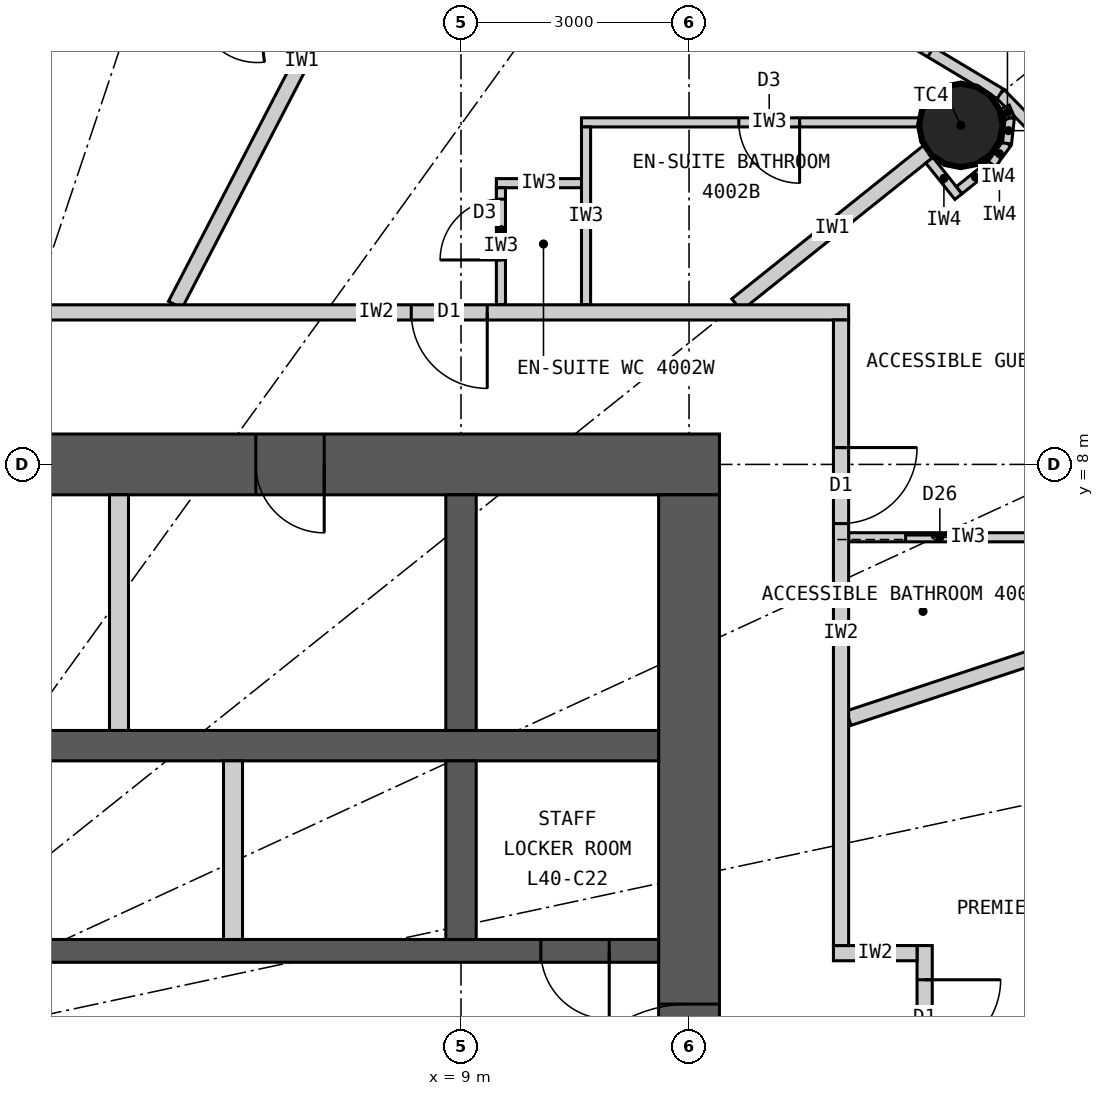
"""IFC4 building model, lengths in metres.
Left out: names, types, materials, properties, quantities, classifications, styles, units other than length and angle.
Written with IfcOpenShell. Run it as: python <this file> out.ifc"""

import sys

from ifc_helpers import new_model, si_unit, direction, frame, frame_2d, origin, origin_2d, place, context, subcontext, project, spatial, rectangle, circle, extrude, element, fill, save


model = new_model("IFC4")
c1 = context("Model", 3, precision=1e-05, world=origin(), true_north=direction((0.0, 1.0)))
c2 = subcontext(c1, "Body", "Model", "MODEL_VIEW")
j1 = project(units=[si_unit("LENGTHUNIT", "METRE"), si_unit("PLANEANGLEUNIT", "RADIAN")], contexts=[c1])
p1 = place(None, origin())
s1 = spatial("IfcSite", under=j1, at=p1, CompositionType="ELEMENT")
p2 = place(p1, origin())
s2 = spatial("IfcBuilding", under=s1, at=p2, CompositionType="ELEMENT")
p3 = place(p2, frame((0.0, 0.0, 153.3)))
s3 = spatial("IfcBuildingStorey", under=s2, at=p3, CompositionType="ELEMENT", Elevation=153.3)
p4 = place(p3, frame((15.576, 12.461, 0.0), z_axis=(0.0, 0.0, 1.0), x_axis=(1.0, 0.0, 0.0)))
e1 = element("IfcColumn", 1, at=p4, inside=s3, PredefinedType="COLUMN", context=c2, shape_type="SweptSolid", body=[
    extrude(circle(Radius=0.55, at=origin_2d()), origin(), (0.0, 0.0, 1.0), 3.3),
])
p5 = place(p3, frame((-12.4, 8.0, 0.0), z_axis=(0.0, 0.0, 1.0), x_axis=(1.0, 0.0, 0.0)))
e2 = element("IfcWall", 2, at=p5, inside=s3, PredefinedType="SHEAR", context=c2, shape_type="SweptSolid", body=[
    extrude(rectangle(XDim=24.8, YDim=0.8, at=frame_2d((12.4, 0.0))), origin(), (0.0, 0.0, 1.0), 3.3),
])
p6 = place(p5, frame((11.1, 0.0, 0.0)))
e3 = element("IfcOpeningElement", 3, at=p6, cuts=e2, PredefinedType="OPENING", context=c2, shape_type="SweptSolid", body=[
    extrude(rectangle(XDim=1.2, YDim=2.2, at=frame_2d((0.6, 1.1))), frame((0.0, 0.41, 0.0), z_axis=(0.0, -1.0, 0.0), x_axis=(1.0, 0.0, 0.0)), (0.0, 0.0, 1.0), 0.82),
])
p7 = place(p5, frame((18.7, 0.0, 0.0)))
e4 = element("IfcOpeningElement", 4, at=p7, cuts=e2, PredefinedType="OPENING", context=c2, shape_type="SweptSolid", body=[
    extrude(rectangle(XDim=0.9, YDim=2.2, at=frame_2d((0.45, 1.1))), frame((0.0, 0.41, 0.0), z_axis=(0.0, -1.0, 0.0), x_axis=(1.0, 0.0, 0.0)), (0.0, 0.0, 1.0), 0.82),
])
p8 = place(p3, frame((12.0, -7.6, 0.0), z_axis=(0.0, 0.0, 1.0), x_axis=(0.0, 1.0, 0.0)))
e5 = element("IfcWall", 5, at=p8, inside=s3, PredefinedType="SHEAR", context=c2, shape_type="SweptSolid", body=[
    extrude(rectangle(XDim=15.2, YDim=0.8, at=frame_2d((7.6, 0.0))), origin(), (0.0, 0.0, 1.0), 3.3),
])
p9 = place(p8, frame((6.7, 0.0, 0.0)))
e6 = element("IfcOpeningElement", 6, at=p9, cuts=e5, PredefinedType="OPENING", context=c2, shape_type="SweptSolid", body=[
    extrude(rectangle(XDim=1.8, YDim=2.2, at=frame_2d((0.9, 1.1))), frame((0.0, 0.41, 0.0), z_axis=(0.0, -1.0, 0.0), x_axis=(1.0, 0.0, 0.0)), (0.0, 0.0, 1.0), 0.82),
])
p10 = place(p3, frame((-11.6, 4.3, 0.0), z_axis=(0.0, 0.0, 1.0), x_axis=(1.0, 0.0, 0.0)))
e7 = element("IfcWall", 7, at=p10, inside=s3, PredefinedType="SHEAR", context=c2, shape_type="SweptSolid", body=[
    extrude(rectangle(XDim=23.2, YDim=0.4, at=frame_2d((11.6, 0.0))), origin(), (0.0, 0.0, 1.0), 3.3),
])
p11 = place(p3, frame((-11.6, 1.6, 0.0), z_axis=(0.0, 0.0, 1.0), x_axis=(1.0, 0.0, 0.0)))
e8 = element("IfcWall", 8, at=p11, inside=s3, PredefinedType="SHEAR", context=c2, shape_type="SweptSolid", body=[
    extrude(rectangle(XDim=23.2, YDim=0.3, at=frame_2d((11.6, 0.0))), origin(), (0.0, 0.0, 1.0), 3.3),
])
p12 = place(p11, frame((9.55, 0.0, 0.0)))
e9 = element("IfcOpeningElement", 9, at=p12, cuts=e8, PredefinedType="OPENING", context=c2, shape_type="SweptSolid", body=[
    extrude(rectangle(XDim=1.1, YDim=2.2, at=frame_2d((0.55, 1.1))), frame((0.0, 0.16, 0.0), z_axis=(0.0, -1.0, 0.0), x_axis=(1.0, 0.0, 0.0)), (0.0, 0.0, 1.0), 0.32),
])
p13 = place(p11, frame((12.55, 0.0, 0.0)))
e10 = element("IfcOpeningElement", 10, at=p13, cuts=e8, PredefinedType="OPENING", context=c2, shape_type="SweptSolid", body=[
    extrude(rectangle(XDim=1.1, YDim=2.2, at=frame_2d((0.55, 1.1))), frame((0.0, 0.16, 0.0), z_axis=(0.0, -1.0, 0.0), x_axis=(1.0, 0.0, 0.0)), (0.0, 0.0, 1.0), 0.32),
])
p14 = place(p11, frame((5.15, 0.0, 0.0)))
e11 = element("IfcOpeningElement", 11, at=p14, cuts=e8, PredefinedType="OPENING", context=c2, shape_type="SweptSolid", body=[
    extrude(rectangle(XDim=0.9, YDim=2.2, at=frame_2d((0.45, 1.1))), frame((0.0, 0.16, 0.0), z_axis=(0.0, -1.0, 0.0), x_axis=(1.0, 0.0, 0.0)), (0.0, 0.0, 1.0), 0.32),
])
p15 = place(p11, frame((21.65, 0.0, 0.0)))
e12 = element("IfcOpeningElement", 12, at=p15, cuts=e8, PredefinedType="OPENING", context=c2, shape_type="SweptSolid", body=[
    extrude(rectangle(XDim=0.9, YDim=2.2, at=frame_2d((0.45, 1.1))), frame((0.0, 0.16, 0.0), z_axis=(0.0, -1.0, 0.0), x_axis=(1.0, 0.0, 0.0)), (0.0, 0.0, 1.0), 0.32),
])
p16 = place(p11, frame((0.65, 0.0, 0.0)))
e13 = element("IfcOpeningElement", 13, at=p16, cuts=e8, PredefinedType="OPENING", context=c2, shape_type="SweptSolid", body=[
    extrude(rectangle(XDim=0.9, YDim=2.2, at=frame_2d((0.45, 1.1))), frame((0.0, 0.16, 0.0), z_axis=(0.0, -1.0, 0.0), x_axis=(1.0, 0.0, 0.0)), (0.0, 0.0, 1.0), 0.32),
])
p17 = place(p3, frame((9.0, 4.5, 0.0), z_axis=(0.0, 0.0, 1.0), x_axis=(0.0, 1.0, 0.0)))
e14 = element("IfcWall", 14, at=p17, inside=s3, PredefinedType="SHEAR", context=c2, shape_type="SweptSolid", body=[
    extrude(rectangle(XDim=3.1, YDim=0.4, at=frame_2d((1.55, 0.0))), origin(), (0.0, 0.0, 1.0), 3.3),
])
p18 = place(p3, frame((9.0, 1.75, 0.0), z_axis=(0.0, 0.0, 1.0), x_axis=(0.0, 1.0, 0.0)))
e15 = element("IfcWall", 15, at=p18, inside=s3, PredefinedType="SHEAR", context=c2, shape_type="SweptSolid", body=[
    extrude(rectangle(XDim=2.35, YDim=0.4, at=frame_2d((1.175, 0.0))), origin(), (0.0, 0.0, 1.0), 3.3),
])
p19 = place(p3, frame((4.5, 4.5, 0.0), z_axis=(0.0, 0.0, 1.0), x_axis=(0.0, 1.0, 0.0)))
e16 = element("IfcWall", 16, at=p19, inside=s3, PredefinedType="PARTITIONING", context=c2, shape_type="SweptSolid", body=[
    extrude(rectangle(XDim=3.1, YDim=0.25, at=frame_2d((1.55, 0.0))), origin(), (0.0, 0.0, 1.0), 3.3),
])
p20 = place(p3, frame((6.0, 1.75, 0.0), z_axis=(0.0, 0.0, 1.0), x_axis=(0.0, 1.0, 0.0)))
e17 = element("IfcWall", 17, at=p20, inside=s3, PredefinedType="PARTITIONING", context=c2, shape_type="SweptSolid", body=[
    extrude(rectangle(XDim=2.35, YDim=0.25, at=frame_2d((1.175, 0.0))), origin(), (0.0, 0.0, 1.0), 3.3),
])
p21 = place(p3, frame((19.772, 9.132, 0.0), z_axis=(0.0, 0.0, 1.0), x_axis=(-0.700727467776, 0.71342905457, 0.0)))
e18 = element("IfcWall", 18, at=p21, inside=s3, PredefinedType="ELEMENTEDWALL", context=c2, shape_type="SweptSolid", body=[
    extrude(rectangle(XDim=5.247, YDim=0.15, at=frame_2d((2.624, 0.0))), origin(), (0.0, 0.0, 1.0), 3.12),
])
p22 = place(p21, frame((0.924, 0.0, 0.9)))
e19 = element("IfcOpeningElement", 19, at=p22, cuts=e18, PredefinedType="OPENING", context=c2, shape_type="SweptSolid", body=[
    extrude(rectangle(XDim=1.4, YDim=1.9, at=frame_2d((0.7, 0.95))), frame((0.0, 0.085, 0.0), z_axis=(0.0, -1.0, 0.0), x_axis=(1.0, 0.0, 0.0)), (0.0, 0.0, 1.0), 0.17),
])
p23 = place(p21, frame((2.924, 0.0, 0.9)))
e20 = element("IfcOpeningElement", 20, at=p23, cuts=e18, PredefinedType="OPENING", context=c2, shape_type="SweptSolid", body=[
    extrude(rectangle(XDim=1.4, YDim=1.9, at=frame_2d((0.7, 0.95))), frame((0.0, 0.085, 0.0), z_axis=(0.0, -1.0, 0.0), x_axis=(1.0, 0.0, 0.0)), (0.0, 0.0, 1.0), 0.17),
])
p24 = place(p3, frame((16.095, 12.876, 0.0), z_axis=(0.0, 0.0, 1.0), x_axis=(-0.857695199231, 0.514158482587, 0.0)))
e21 = element("IfcWall", 21, at=p24, inside=s3, PredefinedType="ELEMENTEDWALL", context=c2, shape_type="SweptSolid", body=[
    extrude(rectangle(XDim=5.536, YDim=0.15, at=frame_2d((2.768, 0.0))), origin(), (0.0, 0.0, 1.0), 3.12),
])
p25 = place(p24, frame((1.068, 0.0, 0.9)))
e22 = element("IfcOpeningElement", 22, at=p25, cuts=e21, PredefinedType="OPENING", context=c2, shape_type="SweptSolid", body=[
    extrude(rectangle(XDim=1.4, YDim=1.9, at=frame_2d((0.7, 0.95))), frame((0.0, 0.085, 0.0), z_axis=(0.0, -1.0, 0.0), x_axis=(1.0, 0.0, 0.0)), (0.0, 0.0, 1.0), 0.17),
])
p26 = place(p24, frame((3.068, 0.0, 0.9)))
e23 = element("IfcOpeningElement", 23, at=p26, cuts=e21, PredefinedType="OPENING", context=c2, shape_type="SweptSolid", body=[
    extrude(rectangle(XDim=1.4, YDim=1.9, at=frame_2d((0.7, 0.95))), frame((0.0, 0.085, 0.0), z_axis=(0.0, -1.0, 0.0), x_axis=(1.0, 0.0, 0.0)), (0.0, 0.0, 1.0), 0.17),
])
p27 = place(p3, frame((14.1, 4.661, 0.0), z_axis=(0.0, 0.0, 1.0), x_axis=(0.949453216399, 0.313908569285, 0.0)))
e24 = element("IfcWall", 24, at=p27, inside=s3, PredefinedType="PARTITIONING", context=c2, shape_type="SweptSolid", body=[
    extrude(rectangle(XDim=7.109, YDim=0.2, at=frame_2d((3.554, 0.0))), origin(), (0.0, 0.0, 1.0), 3.12),
])
p28 = place(p3, frame((12.625, 10.1, 0.0), z_axis=(0.0, 0.0, 1.0), x_axis=(0.780876185034, 0.624685827954, 0.0)))
e25 = element("IfcWall", 25, at=p28, inside=s3, PredefinedType="PARTITIONING", context=c2, shape_type="SweptSolid", body=[
    extrude(rectangle(XDim=3.229, YDim=0.2, at=frame_2d((1.615, 0.0))), origin(), (0.0, 0.0, 1.0), 2.42),
])
p29 = place(p3, frame((5.24, 10.1, 0.0), z_axis=(0.0, 0.0, 1.0), x_axis=(0.460532965373, 0.887642601391, 0.0)))
e26 = element("IfcWall", 26, at=p29, inside=s3, PredefinedType="PARTITIONING", context=c2, shape_type="SweptSolid", body=[
    extrude(rectangle(XDim=7.231, YDim=0.2, at=frame_2d((3.616, 0.0))), origin(), (0.0, 0.0, 1.0), 3.12),
])
p30 = place(p3, frame((15.1, -1.67, 0.0), z_axis=(0.0, 0.0, 1.0), x_axis=(0.0, 1.0, 0.0)))
e27 = element("IfcWall", 27, at=p30, inside=s3, PredefinedType="PARTITIONING", context=c2, shape_type="SweptSolid", body=[
    extrude(rectangle(XDim=3.34, YDim=0.2, at=frame_2d((1.67, 0.0))), origin(), (0.0, 0.0, 1.0), 3.12),
])
p31 = place(p30, frame((0.45, 0.0, 0.0)))
e28 = element("IfcOpeningElement", 28, at=p31, cuts=e27, PredefinedType="OPENING", context=c2, shape_type="SweptSolid", body=[
    extrude(rectangle(XDim=1.0, YDim=2.2, at=frame_2d((0.5, 1.1))), frame((0.0, 0.11, 0.0), z_axis=(0.0, -1.0, 0.0), x_axis=(1.0, 0.0, 0.0)), (0.0, 0.0, 1.0), 0.22),
])
p32 = place(p30, frame((1.89, 0.0, 0.0)))
e29 = element("IfcOpeningElement", 29, at=p32, cuts=e27, PredefinedType="OPENING", context=c2, shape_type="SweptSolid", body=[
    extrude(rectangle(XDim=1.0, YDim=2.2, at=frame_2d((0.5, 1.1))), frame((0.0, 0.11, 0.0), z_axis=(0.0, -1.0, 0.0), x_axis=(1.0, 0.0, 0.0)), (0.0, 0.0, 1.0), 0.22),
])
p33 = place(p3, frame((13.9, 1.57, 0.0), z_axis=(0.0, 0.0, 1.0), x_axis=(1.0, 0.0, 0.0)))
e30 = element("IfcWall", 30, at=p33, inside=s3, PredefinedType="PARTITIONING", context=c2, shape_type="SweptSolid", body=[
    extrude(rectangle(XDim=1.1, YDim=0.2, at=frame_2d((0.55, 0.0))), origin(), (0.0, 0.0, 1.0), 2.47),
])
p34 = place(p3, frame((14.1, 7.042, 0.0), z_axis=(0.0, 0.0, 1.0), x_axis=(1.0, 0.0, 0.0)))
e31 = element("IfcWall", 31, at=p34, inside=s3, PredefinedType="PARTITIONING", context=c2, shape_type="SweptSolid", body=[
    extrude(rectangle(XDim=3.14, YDim=0.12, at=frame_2d((1.57, 0.0))), origin(), (0.0, 0.0, 1.0), 3.12),
])
p35 = place(p34, frame((0.75, 0.0, 0.0)))
e32 = element("IfcOpeningElement", 32, at=p35, cuts=e31, PredefinedType="OPENING", context=c2, shape_type="SweptSolid", body=[
    extrude(rectangle(XDim=0.9, YDim=2.1, at=frame_2d((0.45, 1.05))), frame((0.0, 0.07, 0.0), z_axis=(0.0, -1.0, 0.0), x_axis=(1.0, 0.0, 0.0)), (0.0, 0.0, 1.0), 0.14),
])
p36 = place(p3, frame((15.525, 12.5, 0.0), z_axis=(0.0, 0.0, 1.0), x_axis=(-1.0, 0.0, 0.0)))
e33 = element("IfcWall", 33, at=p36, inside=s3, PredefinedType="PARTITIONING", context=c2, shape_type="SweptSolid", body=[
    extrude(rectangle(XDim=4.94, YDim=0.12, at=frame_2d((2.47, 0.0))), origin(), (0.0, 0.0, 1.0), 3.12),
])
p37 = place(p36, frame((2.07, 0.0, 0.0)))
e34 = element("IfcOpeningElement", 34, at=p37, cuts=e33, PredefinedType="OPENING", context=c2, shape_type="SweptSolid", body=[
    extrude(rectangle(XDim=0.8, YDim=2.1, at=frame_2d((0.4, 1.05))), frame((0.0, 0.07, 0.0), z_axis=(0.0, -1.0, 0.0), x_axis=(1.0, 0.0, 0.0)), (0.0, 0.0, 1.0), 0.14),
])
p38 = place(p3, frame((10.645, 10.1, 0.0), z_axis=(0.0, 0.0, 1.0), x_axis=(0.0, 1.0, 0.0)))
e35 = element("IfcWall", 35, at=p38, inside=s3, PredefinedType="PARTITIONING", context=c2, shape_type="SweptSolid", body=[
    extrude(rectangle(XDim=2.34, YDim=0.12, at=frame_2d((1.17, 0.0))), origin(), (0.0, 0.0, 1.0), 3.12),
])
p39 = place(p3, frame((10.585, 11.7, 0.0), z_axis=(0.0, 0.0, 1.0), x_axis=(-1.0, 0.0, 0.0)))
e36 = element("IfcWall", 36, at=p39, inside=s3, PredefinedType="PARTITIONING", context=c2, shape_type="SweptSolid", body=[
    extrude(rectangle(XDim=1.12, YDim=0.12, at=frame_2d((0.56, 0.0))), origin(), (0.0, 0.0, 1.0), 3.12),
])
p40 = place(p3, frame((9.525, 10.1, 0.0), z_axis=(0.0, 0.0, 1.0), x_axis=(0.0, 1.0, 0.0)))
e37 = element("IfcWall", 37, at=p40, inside=s3, PredefinedType="PARTITIONING", context=c2, shape_type="SweptSolid", body=[
    extrude(rectangle(XDim=1.54, YDim=0.12, at=frame_2d((0.77, 0.0))), origin(), (0.0, 0.0, 1.0), 3.12),
])
p41 = place(p40, frame((0.59, 0.0, 0.0)))
e38 = element("IfcOpeningElement", 38, at=p41, cuts=e37, PredefinedType="OPENING", context=c2, shape_type="SweptSolid", body=[
    extrude(rectangle(XDim=0.8, YDim=2.1, at=frame_2d((0.4, 1.05))), frame((0.0, 0.07, 0.0), z_axis=(0.0, -1.0, 0.0), x_axis=(1.0, 0.0, 0.0)), (0.0, 0.0, 1.0), 0.14),
])
p42 = place(p3, frame((1.67, 10.0, 0.0), z_axis=(0.0, 0.0, 1.0), x_axis=(1.0, 0.0, 0.0)))
e39 = element("IfcWall", 39, at=p42, inside=s3, PredefinedType="PARTITIONING", context=c2, shape_type="SweptSolid", body=[
    extrude(rectangle(XDim=12.43, YDim=0.2, at=frame_2d((6.215, 0.0))), origin(), (0.0, 0.0, 1.0), 3.12),
])
p43 = place(p42, frame((6.675, 0.0, 0.0)))
e40 = element("IfcOpeningElement", 40, at=p43, cuts=e39, PredefinedType="OPENING", context=c2, shape_type="SweptSolid", body=[
    extrude(rectangle(XDim=1.0, YDim=2.2, at=frame_2d((0.5, 1.1))), frame((0.0, 0.11, 0.0), z_axis=(0.0, -1.0, 0.0), x_axis=(1.0, 0.0, 0.0)), (0.0, 0.0, 1.0), 0.22),
])
p44 = place(p3, frame((14.0, 1.67, 0.0), z_axis=(0.0, 0.0, 1.0), x_axis=(0.0, 1.0, 0.0)))
e41 = element("IfcWall", 41, at=p44, inside=s3, PredefinedType="PARTITIONING", context=c2, shape_type="SweptSolid", body=[
    extrude(rectangle(XDim=8.23, YDim=0.2, at=frame_2d((4.115, 0.0))), origin(), (0.0, 0.0, 1.0), 3.12),
])
p45 = place(p44, frame((5.552, 0.0, 0.0)))
e42 = element("IfcOpeningElement", 42, at=p45, cuts=e41, PredefinedType="OPENING", context=c2, shape_type="SweptSolid", body=[
    extrude(rectangle(XDim=1.0, YDim=2.2, at=frame_2d((0.5, 1.1))), frame((0.0, 0.11, 0.0), z_axis=(0.0, -1.0, 0.0), x_axis=(1.0, 0.0, 0.0)), (0.0, 0.0, 1.0), 0.22),
])
p46 = place(p3, frame((15.162, 12.002, 0.0), z_axis=(0.0, 0.0, 1.0), x_axis=(0.624597762427, -0.780946627607, 0.0)))
e43 = element("IfcWall", 43, at=p46, inside=s3, PredefinedType="PARTITIONING", context=c2, shape_type="SweptSolid", body=[
    extrude(rectangle(XDim=0.612, YDim=0.12, at=frame_2d((0.306, 0.0))), origin(), (0.0, 0.0, 1.0), 3.12),
])
p47 = place(p3, frame((15.554, 11.608, 0.0), z_axis=(0.0, 0.0, 1.0), x_axis=(0.780695577787, 0.624911525597, 0.0)))
e44 = element("IfcWall", 44, at=p47, inside=s3, PredefinedType="PARTITIONING", context=c2, shape_type="SweptSolid", body=[
    extrude(rectangle(XDim=0.55, YDim=0.12, at=frame_2d((0.275, 0.0))), origin(), (0.0, 0.0, 1.0), 3.12),
])
p48 = place(p3, frame((15.984, 11.952, 0.0), z_axis=(0.0, 0.0, 1.0), x_axis=(0.592335221171, 0.805691619517, 0.0)))
e45 = element("IfcWall", 45, at=p48, inside=s3, PredefinedType="PARTITIONING", context=c2, shape_type="SweptSolid", body=[
    extrude(rectangle(XDim=0.338, YDim=0.12, at=frame_2d((0.169, 0.0))), origin(), (0.0, 0.0, 1.0), 3.12),
])
p49 = place(p3, frame((16.184, 12.224, 0.0), z_axis=(0.0, 0.0, 1.0), x_axis=(0.110669692975, 0.993857242795, 0.0)))
e46 = element("IfcWall", 46, at=p49, inside=s3, PredefinedType="PARTITIONING", context=c2, shape_type="SweptSolid", body=[
    extrude(rectangle(XDim=0.337, YDim=0.12, at=frame_2d((0.169, 0.0))), origin(), (0.0, 0.0, 1.0), 3.12),
])
p50 = place(p3, frame((16.221, 12.559, 0.0), z_axis=(0.0, 0.0, 1.0), x_axis=(-0.401064416249, 0.916049853457, 0.0)))
e47 = element("IfcWall", 47, at=p50, inside=s3, PredefinedType="PARTITIONING", context=c2, shape_type="SweptSolid", body=[
    extrude(rectangle(XDim=0.156, YDim=0.12, at=frame_2d((0.078, 0.0))), origin(), (0.0, 0.0, 1.0), 3.12),
])
p51 = place(p25, origin())
e48 = element("IfcWindow", 48, at=p51, inside=s3, PartitioningType="SINGLE_PANEL", PredefinedType="WINDOW", context=c2, shape_type="SweptSolid", body=[
    extrude(rectangle(XDim=1.4, YDim=1.9, at=frame_2d((0.7, 0.95))), frame((0.0, 0.03, 0.0), z_axis=(0.0, -1.0, 0.0), x_axis=(1.0, 0.0, 0.0)), (0.0, 0.0, 1.0), 0.06),
])
fill(e22, e48)
p52 = place(p35, origin())
e49 = element("IfcDoor", 49, at=p52, inside=s3, OperationType="SLIDING_TO_LEFT", PredefinedType="DOOR", context=c2, shape_type="SweptSolid", body=[
    extrude(rectangle(XDim=0.9, YDim=2.1, at=frame_2d((0.45, 1.05))), frame((0.0, 0.025, 0.0), z_axis=(0.0, -1.0, 0.0), x_axis=(1.0, 0.0, 0.0)), (0.0, 0.0, 1.0), 0.05),
])
fill(e32, e49)
p53 = place(p45, origin())
e50 = element("IfcDoor", 50, at=p53, inside=s3, OperationType="SINGLE_SWING_RIGHT", PredefinedType="DOOR", context=c2, shape_type="SweptSolid", body=[
    extrude(rectangle(XDim=1.0, YDim=2.2, at=frame_2d((0.5, 1.1))), frame((0.0, 0.025, 0.0), z_axis=(0.0, -1.0, 0.0), x_axis=(1.0, 0.0, 0.0)), (0.0, 0.0, 1.0), 0.05),
])
fill(e42, e50)
p54 = place(p37, origin())
e51 = element("IfcDoor", 51, at=p54, inside=s3, OperationType="SINGLE_SWING_LEFT", PredefinedType="DOOR", context=c2, shape_type="SweptSolid", body=[
    extrude(rectangle(XDim=0.8, YDim=2.1, at=frame_2d((0.4, 1.05))), frame((0.0, 0.025, 0.0), z_axis=(0.0, -1.0, 0.0), x_axis=(1.0, 0.0, 0.0)), (0.0, 0.0, 1.0), 0.05),
])
fill(e34, e51)
p55 = place(p41, origin())
e52 = element("IfcDoor", 52, at=p55, inside=s3, OperationType="SINGLE_SWING_LEFT", PredefinedType="DOOR", context=c2, shape_type="SweptSolid", body=[
    extrude(rectangle(XDim=0.8, YDim=2.1, at=frame_2d((0.4, 1.05))), frame((0.0, 0.025, 0.0), z_axis=(0.0, -1.0, 0.0), x_axis=(1.0, 0.0, 0.0)), (0.0, 0.0, 1.0), 0.05),
])
fill(e38, e52)
p56 = place(p43, origin())
e53 = element("IfcDoor", 53, at=p56, inside=s3, OperationType="SINGLE_SWING_RIGHT", PredefinedType="DOOR", context=c2, shape_type="SweptSolid", body=[
    extrude(rectangle(XDim=1.0, YDim=2.2, at=frame_2d((0.5, 1.1))), frame((0.0, 0.025, 0.0), z_axis=(0.0, -1.0, 0.0), x_axis=(1.0, 0.0, 0.0)), (0.0, 0.0, 1.0), 0.05),
])
fill(e40, e53)
p57 = place(p32, origin())
e54 = element("IfcDoor", 54, at=p57, inside=s3, OperationType="SINGLE_SWING_RIGHT", PredefinedType="DOOR", context=c2, shape_type="SweptSolid", body=[
    extrude(rectangle(XDim=1.0, YDim=2.2, at=frame_2d((0.5, 1.1))), frame((0.0, 0.025, 0.0), z_axis=(0.0, -1.0, 0.0), x_axis=(1.0, 0.0, 0.0)), (0.0, 0.0, 1.0), 0.05),
])
fill(e29, e54)
p58 = place(p7, origin())
e55 = element("IfcDoor", 55, at=p58, inside=s3, OperationType="SINGLE_SWING_RIGHT", PredefinedType="DOOR", context=c2, shape_type="SweptSolid", body=[
    extrude(rectangle(XDim=0.9, YDim=2.2, at=frame_2d((0.45, 1.1))), frame((0.0, 0.025, 0.0), z_axis=(0.0, -1.0, 0.0), x_axis=(1.0, 0.0, 0.0)), (0.0, 0.0, 1.0), 0.05),
])
fill(e4, e55)
p59 = place(p15, origin())
e56 = element("IfcDoor", 56, at=p59, inside=s3, OperationType="SINGLE_SWING_RIGHT", PredefinedType="DOOR", context=c2, shape_type="SweptSolid", body=[
    extrude(rectangle(XDim=0.9, YDim=2.2, at=frame_2d((0.45, 1.1))), frame((0.0, 0.025, 0.0), z_axis=(0.0, -1.0, 0.0), x_axis=(1.0, 0.0, 0.0)), (0.0, 0.0, 1.0), 0.05),
])
fill(e12, e56)
p60 = place(p9, origin())
e57 = element("IfcDoor", 57, at=p60, inside=s3, OperationType="DOUBLE_DOOR_DOUBLE_SWING", PredefinedType="DOOR", context=c2, shape_type="SweptSolid", body=[
    extrude(rectangle(XDim=1.8, YDim=2.2, at=frame_2d((0.9, 1.1))), frame((0.0, 0.025, 0.0), z_axis=(0.0, -1.0, 0.0), x_axis=(1.0, 0.0, 0.0)), (0.0, 0.0, 1.0), 0.05),
])
fill(e6, e57)
save(model, sys.argv[1])
